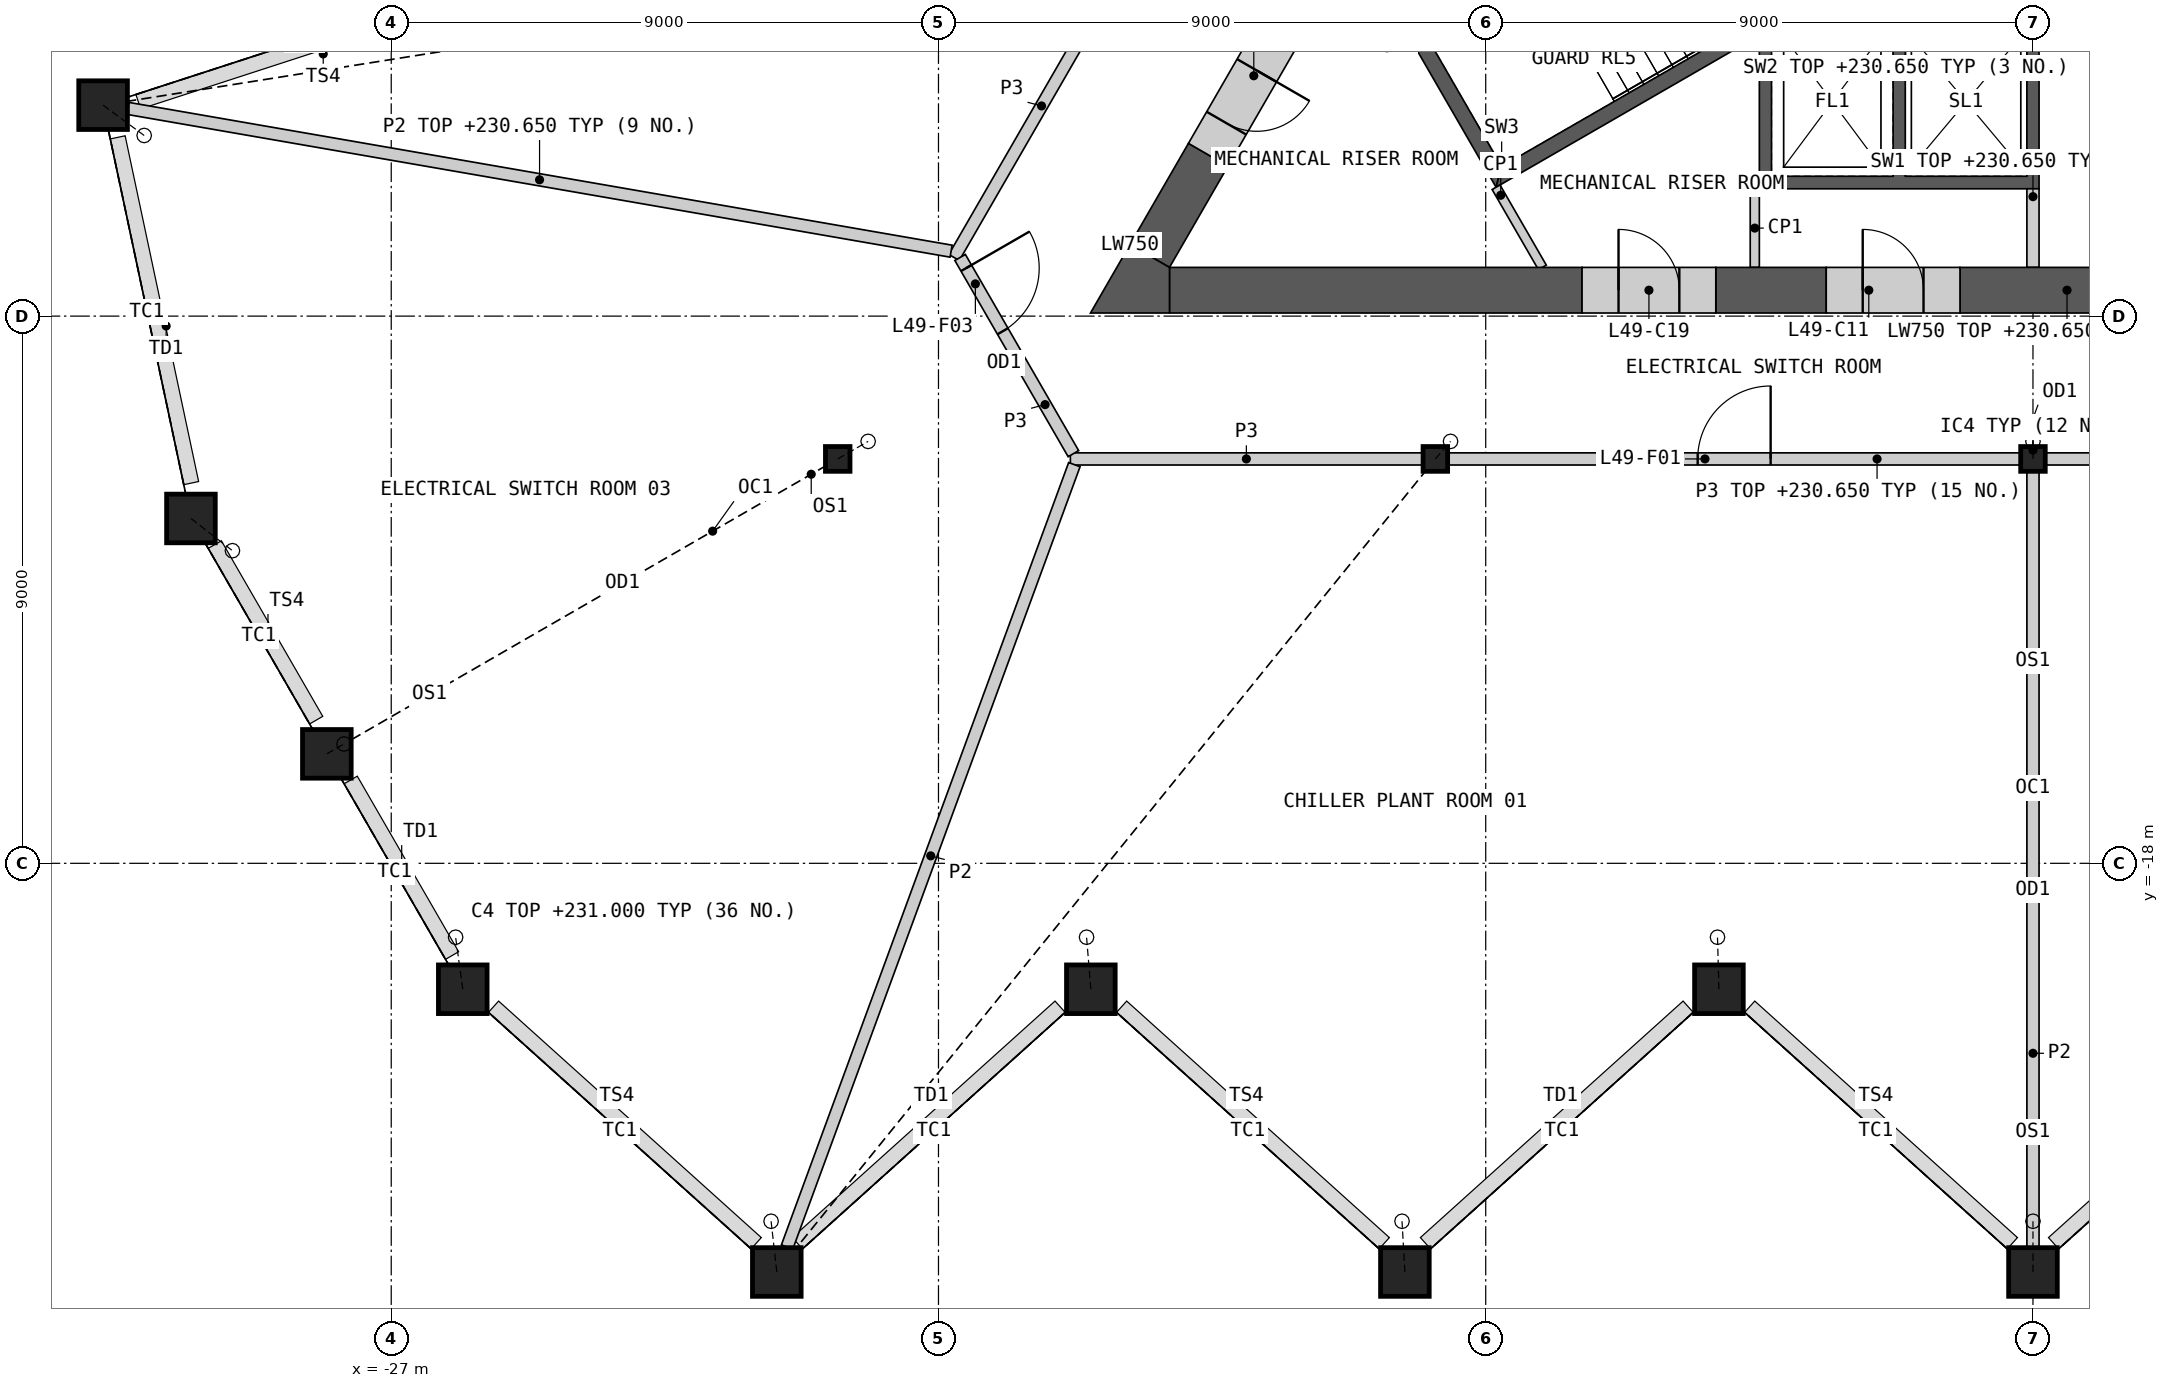
"""IFC4 building model, lengths in metres.
Left out: names, types, materials, properties, quantities, classifications, styles, units other than length and angle.
Written with IfcOpenShell. Run it as: python <this file> out.ifc"""

import sys

from ifc_helpers import new_model, si_unit, direction, frame, frame_2d, origin, origin_2d, place, context, subcontext, project, spatial, polyline, rectangle, hollow_rectangle, i_section, outline, extrude, element, fill, save


model = new_model("IFC4")
c1 = context("Model", 3, precision=1e-05, world=origin(), true_north=direction((0.0, 1.0)))
c2 = subcontext(c1, "Body", "Model", "MODEL_VIEW")
j1 = project(units=[si_unit("LENGTHUNIT", "METRE"), si_unit("PLANEANGLEUNIT", "RADIAN")], contexts=[c1])
p1 = place(None, origin())
s1 = spatial("IfcSite", under=j1, at=p1, CompositionType="ELEMENT")
p2 = place(p1, origin())
s2 = spatial("IfcBuilding", under=s1, at=p2, CompositionType="ELEMENT")
p3 = place(p2, frame((0.0, 0.0, 226.0)))
s3 = spatial("IfcBuildingStorey", under=s2, at=p3, CompositionType="ELEMENT", Elevation=226.0)
p4 = place(p3, frame((-25.823, -20.071, 0.0), z_axis=(-0.023191450174, 0.168691336745, 0.9853960572), x_axis=(-0.990681699534, -0.136197541123, 0.0)))
e1 = element("IfcColumn", 1, at=p4, inside=s3, PredefinedType="COLUMN", context=c2, shape_type="SweptSolid", body=[
    extrude(hollow_rectangle(XDim=0.8, YDim=0.8, WallThickness=0.05, at=origin_2d()), frame((0.0, 0.0, 0.069)), (0.0, 0.0, 1.0), 4.936),
])
p5 = place(p3, frame((-20.659, -24.722, 0.0), z_axis=(-0.01853903048, 0.164636221326, 0.986180114876), x_axis=(-0.993719605933, -0.111898814941, 0.0)))
e2 = element("IfcColumn", 2, at=p5, inside=s3, PredefinedType="COLUMN", context=c2, shape_type="SweptSolid", body=[
    extrude(hollow_rectangle(XDim=0.8, YDim=0.8, WallThickness=0.05, at=origin_2d()), frame((0.0, 0.0, 0.067)), (0.0, 0.0, 1.0), 4.936),
])
p6 = place(p3, frame((-15.494, -20.071, 0.0), z_axis=(-0.013907642807, 0.16872040028, 0.985565829359), x_axis=(-0.996619853329, -0.0821514939, 0.0)))
e3 = element("IfcColumn", 3, at=p6, inside=s3, PredefinedType="COLUMN", context=c2, shape_type="SweptSolid", body=[
    extrude(hollow_rectangle(XDim=0.8, YDim=0.8, WallThickness=0.05, at=origin_2d()), frame((0.0, 0.0, 0.069)), (0.0, 0.0, 1.0), 4.936),
])
p7 = place(p3, frame((-10.329, -24.722, 0.0), z_axis=(-0.00929478787, 0.164657407907, 0.98630702367), x_axis=(-0.998410538481, -0.056359530251, 0.0)))
e4 = element("IfcColumn", 4, at=p7, inside=s3, PredefinedType="COLUMN", context=c2, shape_type="SweptSolid", body=[
    extrude(hollow_rectangle(XDim=0.8, YDim=0.8, WallThickness=0.05, at=origin_2d()), frame((0.0, 0.0, 0.067)), (0.0, 0.0, 1.0), 4.936),
])
p8 = place(p3, frame((-5.165, -20.071, 0.0), z_axis=(-0.004620237367, 0.168734918824, 0.985650638196), x_axis=(-0.999625333796, -0.027371372517, 0.0)))
e5 = element("IfcColumn", 5, at=p8, inside=s3, PredefinedType="COLUMN", context=c2, shape_type="SweptSolid", body=[
    extrude(hollow_rectangle(XDim=0.8, YDim=0.8, WallThickness=0.05, at=origin_2d()), frame((0.0, 0.0, 0.069)), (0.0, 0.0, 1.0), 4.936),
])
p9 = place(p3, frame((0.0, -24.722, 0.0), z_axis=(0.0, 0.164664520998, 0.986349631482), x_axis=(-1.0, 0.0, 0.0)))
e6 = element("IfcColumn", 6, at=p9, inside=s3, PredefinedType="COLUMN", context=c2, shape_type="SweptSolid", body=[
    extrude(hollow_rectangle(XDim=0.8, YDim=0.8, WallThickness=0.05, at=origin_2d()), frame((0.0, 0.0, 0.067)), (0.0, 0.0, 1.0), 4.936),
])
p10 = place(p3, frame((-31.739, -5.53, 0.0), z_axis=(0.133288732676, -0.098377485859, 0.986182530781), x_axis=(0.593843336629, 0.804580692995, 0.0)))
e7 = element("IfcColumn", 7, at=p10, inside=s3, PredefinedType="COLUMN", context=c2, shape_type="SweptSolid", body=[
    extrude(hollow_rectangle(XDim=0.8, YDim=0.8, WallThickness=0.05, at=origin_2d()), frame((0.0, 0.0, 0.067)), (0.0, 0.0, 1.0), 4.936),
])
p11 = place(p3, frame((-30.294, -12.328, 0.0), z_axis=(0.134482076703, -0.104410055973, 0.985399975268), x_axis=(0.613255605762, 0.789884524473, 0.0)))
e8 = element("IfcColumn", 8, at=p11, inside=s3, PredefinedType="COLUMN", context=c2, shape_type="SweptSolid", body=[
    extrude(hollow_rectangle(XDim=0.8, YDim=0.8, WallThickness=0.05, at=origin_2d()), frame((0.0, 0.0, 0.069)), (0.0, 0.0, 1.0), 4.936),
])
p12 = place(p3, frame((-28.059, -16.2, 0.0), z_axis=(0.056374318387, 0.032548007504, 0.997879032465), x_axis=(-0.500003221507, 0.866023543838, 0.0)))
e9 = element("IfcColumn", 9, at=p12, inside=s3, PredefinedType="COLUMN", context=c2, shape_type="SweptSolid", body=[
    extrude(hollow_rectangle(XDim=0.8, YDim=0.8, WallThickness=0.05, at=origin_2d()), frame((0.0, 0.0, 0.026)), (0.0, 0.0, 1.0), 4.958),
])
p13 = place(p3, frame((-19.657, -11.349, 0.0), z_axis=(0.099340040995, 0.057333949442, 0.993400409954), x_axis=(-0.499868889286, 0.866101087359, 0.0)))
e10 = element("IfcColumn", 10, at=p13, inside=s3, PredefinedType="COLUMN", context=c2, shape_type="SweptSolid", body=[
    extrude(i_section(OverallWidth=0.404, OverallDepth=0.407, WebThickness=0.027, FlangeThickness=0.044, at=origin_2d()), frame((0.0, 0.0, 0.023)), (0.0, 0.0, 1.0), 4.986),
])
p14 = place(p3, frame((-9.828, -11.349, 0.0), z_axis=(0.049854859349, 0.057547308351, 0.997097186989), x_axis=(-0.755815657913, 0.654784461677, 0.0)))
e11 = element("IfcColumn", 11, at=p14, inside=s3, PredefinedType="COLUMN", context=c2, shape_type="SweptSolid", body=[
    extrude(i_section(OverallWidth=0.404, OverallDepth=0.407, WebThickness=0.027, FlangeThickness=0.044, at=origin_2d()), frame((0.0, 0.0, 0.016)), (0.0, 0.0, 1.0), 4.983),
])
p15 = place(p3, frame((0.0, -11.349, 0.0), z_axis=(0.0, 0.057618959063, 0.998338647733), x_axis=(-1.0, 0.0, 0.0)))
e12 = element("IfcColumn", 12, at=p15, inside=s3, PredefinedType="COLUMN", context=c2, shape_type="SweptSolid", body=[
    extrude(i_section(OverallWidth=0.404, OverallDepth=0.407, WebThickness=0.027, FlangeThickness=0.044, at=origin_2d()), frame((0.0, 0.0, 0.012)), (0.0, 0.0, 1.0), 4.985),
])
p16 = place(p3, origin())
e13 = element("IfcWall", 13, at=p16, inside=s3, PredefinedType="SHEAR", context=c2, shape_type="SweptSolid", body=[
    extrude(outline(polyline([(0.1, -4.4), (0.1, -6.906), (-4.5, -6.906), (-4.5, -4.4), (-4.3, -4.4), (-4.3, -6.7), (-2.3, -6.7), (-2.3, -4.4), (-2.1, -4.4), (-2.1, -6.7), (-0.1, -6.7), (-0.1, -4.4), (0.1, -4.4)])), origin(), (0.0, 0.0, 1.0), 4.65),
])
p17 = place(p3, frame((0.0, -6.906, 0.0), z_axis=(0.0, 0.0, 1.0), x_axis=(0.0, -1.0, 0.0)))
e14 = element("IfcWall", 14, at=p17, inside=s3, PredefinedType="SHEAR", context=c2, shape_type="SweptSolid", body=[
    extrude(rectangle(XDim=1.293, YDim=0.2, at=frame_2d((0.646, 0.0))), origin(), (0.0, 0.0, 1.0), 4.65),
])
p18 = place(p3, origin())
e15 = element("IfcWall", 15, at=p18, inside=s3, PredefinedType="SHEAR", context=c2, shape_type="SweptSolid", body=[
    extrude(outline(polyline([(-10.374, -4.206), (-8.83, -6.881), (-8.738, -6.539), (-10.032, -4.298), (-10.374, -4.206)])), origin(), (0.0, 0.0, 1.0), 4.65),
])
p19 = place(p3, origin())
e16 = element("IfcWall", 16, at=p19, inside=s3, PredefinedType="SHEAR", context=c2, shape_type="SweptSolid", body=[
    extrude(outline(polyline([(-8.738, -6.539), (-8.83, -6.881), (-3.763, -3.956), (-3.888, -3.739), (-8.738, -6.539)])), origin(), (0.0, 0.0, 1.0), 4.65),
])
p20 = place(p3, frame((-4.575, -6.906, 0.0), z_axis=(0.0, 0.0, 1.0), x_axis=(0.0, -1.0, 0.0)))
e17 = element("IfcWall", 17, at=p20, inside=s3, PredefinedType="PARTITIONING", context=c2, shape_type="SweptSolid", body=[
    extrude(rectangle(XDim=1.293, YDim=0.15, at=frame_2d((0.646, 0.0))), origin(), (0.0, 0.0, 1.0), 4.65),
])
p21 = place(p3, frame((-8.83, -6.881, 0.0), z_axis=(0.0, 0.0, 1.0), x_axis=(0.500037110984, -0.866003976688, 0.0)))
e18 = element("IfcWall", 18, at=p21, inside=s3, PredefinedType="PARTITIONING", context=c2, shape_type="SweptSolid", body=[
    extrude(rectangle(XDim=1.522, YDim=0.15, at=frame_2d((0.761, 0.0))), origin(), (0.0, 0.0, 1.0), 4.65),
])
p22 = place(p3, frame((-14.201, -8.574, 0.0), z_axis=(0.0, 0.0, 1.0), x_axis=(1.0, 0.0, 0.0)))
e19 = element("IfcWall", 19, at=p22, inside=s3, PredefinedType="SHEAR", context=c2, shape_type="SweptSolid", body=[
    extrude(rectangle(XDim=6.785, YDim=0.75, at=frame_2d((3.393, 0.0))), origin(), (0.0, 0.0, 1.0), 4.65),
])
p23 = place(p3, frame((-1.2, -8.574, 0.0), z_axis=(0.0, 0.0, 1.0), x_axis=(1.0, 0.0, 0.0)))
e20 = element("IfcWall", 20, at=p23, inside=s3, PredefinedType="SHEAR", context=c2, shape_type="SweptSolid", body=[
    extrude(rectangle(XDim=3.52, YDim=0.75, at=frame_2d((1.76, 0.0))), origin(), (0.0, 0.0, 1.0), 4.65),
])
p24 = place(p3, frame((-5.216, -8.574, 0.0), z_axis=(0.0, 0.0, 1.0), x_axis=(1.0, 0.0, 0.0)))
e21 = element("IfcWall", 21, at=p24, inside=s3, PredefinedType="SHEAR", context=c2, shape_type="SweptSolid", body=[
    extrude(rectangle(XDim=1.816, YDim=0.75, at=frame_2d((0.908, 0.0))), origin(), (0.0, 0.0, 1.0), 4.65),
])
p25 = place(p3, frame((-13.564, -6.346, 0.0), z_axis=(0.0, 0.0, 1.0), x_axis=(-0.499989888488, -0.86603124159, 0.0)))
e22 = element("IfcWall", 22, at=p25, inside=s3, PredefinedType="SHEAR", context=c2, shape_type="SweptSolid", body=[
    extrude(rectangle(XDim=1.923, YDim=0.75, at=frame_2d((0.961, 0.0))), origin(), (0.0, 0.0, 1.0), 4.65),
])
p26 = place(p3, origin())
e23 = element("IfcWall", 23, at=p26, inside=s3, PredefinedType="SHEAR", context=c2, shape_type="SweptSolid", body=[
    extrude(outline(polyline([(-14.851, -7.824), (-14.201, -8.199), (-14.201, -8.949), (-15.5, -8.949), (-14.851, -7.824)])), origin(), (0.0, 0.0, 1.0), 4.65),
])
p27 = place(p3, frame((-3.4, -8.574, 0.0), z_axis=(0.0, 0.0, 1.0), x_axis=(1.0, 0.0, 0.0)))
e24 = element("IfcWall", 24, at=p27, inside=s3, PredefinedType="SHEAR", context=c2, shape_type="SweptSolid", body=[
    extrude(rectangle(XDim=2.2, YDim=0.75, at=frame_2d((1.1, 0.0))), origin(), (0.0, 0.0, 1.0), 4.65),
])
p28 = place(p27, frame((0.6, 0.0, 0.0)))
e25 = element("IfcOpeningElement", 25, at=p28, cuts=e24, PredefinedType="OPENING", context=c2, shape_type="SweptSolid", body=[
    extrude(rectangle(XDim=1.0, YDim=2.1, at=frame_2d((0.5, 1.05))), frame((0.0, 0.385, 0.0), z_axis=(0.0, -1.0, 0.0), x_axis=(1.0, 0.0, 0.0)), (0.0, 0.0, 1.0), 0.77),
])
p29 = place(p3, frame((-12.464, -4.441, 0.0), z_axis=(0.0, 0.0, 1.0), x_axis=(-0.499994660107, -0.866028486751, 0.0)))
e26 = element("IfcWall", 26, at=p29, inside=s3, PredefinedType="SHEAR", context=c2, shape_type="SweptSolid", body=[
    extrude(rectangle(XDim=2.2, YDim=0.75, at=frame_2d((1.1, 0.0))), origin(), (0.0, 0.0, 1.0), 4.65),
])
p30 = place(p29, frame((0.6, 0.0, 0.0)))
e27 = element("IfcOpeningElement", 27, at=p30, cuts=e26, PredefinedType="OPENING", context=c2, shape_type="SweptSolid", body=[
    extrude(rectangle(XDim=1.0, YDim=2.1, at=frame_2d((0.5, 1.05))), frame((0.0, 0.385, 0.0), z_axis=(0.0, -1.0, 0.0), x_axis=(1.0, 0.0, 0.0)), (0.0, 0.0, 1.0), 0.77),
])
p31 = place(p3, frame((-7.416, -8.574, 0.0), z_axis=(0.0, 0.0, 1.0), x_axis=(1.0, 0.0, 0.0)))
e28 = element("IfcWall", 28, at=p31, inside=s3, PredefinedType="SHEAR", context=c2, shape_type="SweptSolid", body=[
    extrude(rectangle(XDim=2.2, YDim=0.75, at=frame_2d((1.1, 0.0))), origin(), (0.0, 0.0, 1.0), 4.65),
])
p32 = place(p31, frame((0.6, 0.0, 0.0)))
e29 = element("IfcOpeningElement", 29, at=p32, cuts=e28, PredefinedType="OPENING", context=c2, shape_type="SweptSolid", body=[
    extrude(rectangle(XDim=1.0, YDim=2.1, at=frame_2d((0.5, 1.05))), frame((0.0, 0.385, 0.0), z_axis=(0.0, -1.0, 0.0), x_axis=(1.0, 0.0, 0.0)), (0.0, 0.0, 1.0), 0.77),
])
p33 = place(p3, frame((-9.615, -11.349, 0.0), z_axis=(0.0, 0.0, 1.0), x_axis=(1.0, 0.0, 0.0)))
e30 = element("IfcWall", 30, at=p33, inside=s3, PredefinedType="PARTITIONING", context=c2, shape_type="SweptSolid", body=[
    extrude(rectangle(XDim=9.401, YDim=0.2, at=frame_2d((4.701, 0.0))), origin(), (0.0, 0.0, 1.0), 4.65),
])
p34 = place(p33, frame((4.101, 0.0, 0.0)))
e31 = element("IfcOpeningElement", 31, at=p34, cuts=e30, PredefinedType="OPENING", context=c2, shape_type="SweptSolid", body=[
    extrude(rectangle(XDim=1.2, YDim=2.1, at=frame_2d((0.6, 1.05))), frame((0.0, 0.11, 0.0), z_axis=(0.0, -1.0, 0.0), x_axis=(1.0, 0.0, 0.0)), (0.0, 0.0, 1.0), 0.22),
])
p35 = place(p3, frame((0.214, -11.349, 0.0), z_axis=(0.0, 0.0, 1.0), x_axis=(1.0, 0.0, 0.0)))
e32 = element("IfcWall", 32, at=p35, inside=s3, PredefinedType="PARTITIONING", context=c2, shape_type="SweptSolid", body=[
    extrude(rectangle(XDim=9.401, YDim=0.2, at=frame_2d((4.701, 0.0))), origin(), (0.0, 0.0, 1.0), 4.65),
])
p36 = place(p35, frame((4.101, 0.0, 0.0)))
e33 = element("IfcOpeningElement", 33, at=p36, cuts=e32, PredefinedType="OPENING", context=c2, shape_type="SweptSolid", body=[
    extrude(rectangle(XDim=1.2, YDim=2.1, at=frame_2d((0.6, 1.05))), frame((0.0, 0.11, 0.0), z_axis=(0.0, -1.0, 0.0), x_axis=(1.0, 0.0, 0.0)), (0.0, 0.0, 1.0), 0.22),
])
p37 = place(p3, frame((-15.831, -11.349, 0.0), z_axis=(0.0, 0.0, 1.0), x_axis=(1.0, 0.0, 0.0)))
e34 = element("IfcWall", 34, at=p37, inside=s3, PredefinedType="PARTITIONING", context=c2, shape_type="SweptSolid", body=[
    extrude(rectangle(XDim=5.789, YDim=0.2, at=frame_2d((2.894, 0.0))), origin(), (0.0, 0.0, 1.0), 4.65),
])
p38 = place(p3, frame((-17.744, -8.035, 0.0), z_axis=(0.0, 0.0, 1.0), x_axis=(0.499975807604, 0.86603937082, 0.0)))
e35 = element("IfcWall", 35, at=p38, inside=s3, PredefinedType="PARTITIONING", context=c2, shape_type="SweptSolid", body=[
    extrude(rectangle(XDim=5.756, YDim=0.2, at=frame_2d((2.878, 0.0))), origin(), (0.0, 0.0, 1.0), 4.65),
])
p39 = place(p3, frame((-17.644, -8.035, 0.0), z_axis=(0.0, 0.0, 1.0), x_axis=(0.499958791762, -0.866049194065, 0.0)))
e36 = element("IfcWall", 36, at=p39, inside=s3, PredefinedType="PARTITIONING", context=c2, shape_type="SweptSolid", body=[
    extrude(rectangle(XDim=3.726, YDim=0.2, at=frame_2d((1.863, 0.0))), origin(), (0.0, 0.0, 1.0), 4.65),
])
p40 = place(p39, frame((0.201, 0.0, 0.0)))
e37 = element("IfcOpeningElement", 37, at=p40, cuts=e36, PredefinedType="OPENING", context=c2, shape_type="SweptSolid", body=[
    extrude(rectangle(XDim=1.2, YDim=2.1, at=frame_2d((0.6, 1.05))), frame((0.0, 0.11, 0.0), z_axis=(0.0, -1.0, 0.0), x_axis=(1.0, 0.0, 0.0)), (0.0, 0.0, 1.0), 0.22),
])
p41 = place(p3, frame((-31.329, -5.584, 0.0), z_axis=(0.0, 0.0, 1.0), x_axis=(0.985288995773, -0.170896444691, 0.0)))
e38 = element("IfcWall", 38, at=p41, inside=s3, PredefinedType="PARTITIONING", context=c2, shape_type="SweptSolid", body=[
    extrude(rectangle(XDim=13.739, YDim=0.2, at=frame_2d((6.869, 0.0))), origin(), (0.0, 0.0, 1.0), 4.65),
])
p42 = place(p3, frame((-20.49, -24.312, 0.0), z_axis=(0.0, 0.0, 1.0), x_axis=(0.344647088239, 0.938732328498, 0.0)))
e39 = element("IfcWall", 39, at=p42, inside=s3, PredefinedType="PARTITIONING", context=c2, shape_type="SweptSolid", body=[
    extrude(rectangle(XDim=13.708, YDim=0.2, at=frame_2d((6.854, 0.0))), origin(), (0.0, 0.0, 1.0), 4.65),
])
p43 = place(p3, frame((0.0, -24.312, 0.0), z_axis=(0.0, 0.0, 1.0), x_axis=(0.0, 1.0, 0.0)))
e40 = element("IfcWall", 40, at=p43, inside=s3, PredefinedType="PARTITIONING", context=c2, shape_type="SweptSolid", body=[
    extrude(rectangle(XDim=12.749, YDim=0.2, at=frame_2d((6.375, 0.0))), origin(), (0.0, 0.0, 1.0), 4.65),
])
p44 = place(p28, origin())
e41 = element("IfcDoor", 41, at=p44, inside=s3, OperationType="SINGLE_SWING_LEFT", PredefinedType="DOOR", context=c2, shape_type="SweptSolid", body=[
    extrude(rectangle(XDim=1.0, YDim=2.1, at=frame_2d((0.5, 1.05))), frame((0.0, 0.13, 0.0), z_axis=(0.0, -1.0, 0.0), x_axis=(1.0, 0.0, 0.0)), (0.0, 0.0, 1.0), 0.05),
])
fill(e25, e41)
p45 = place(p30, origin())
e42 = element("IfcDoor", 42, at=p45, inside=s3, OperationType="SINGLE_SWING_LEFT", PredefinedType="DOOR", context=c2, shape_type="SweptSolid", body=[
    extrude(rectangle(XDim=1.0, YDim=2.1, at=frame_2d((0.5, 1.05))), frame((0.0, 0.13, 0.0), z_axis=(0.0, -1.0, 0.0), x_axis=(1.0, 0.0, 0.0)), (0.0, 0.0, 1.0), 0.05),
])
fill(e27, e42)
p46 = place(p32, origin())
e43 = element("IfcDoor", 43, at=p46, inside=s3, OperationType="SINGLE_SWING_LEFT", PredefinedType="DOOR", context=c2, shape_type="SweptSolid", body=[
    extrude(rectangle(XDim=1.0, YDim=2.1, at=frame_2d((0.5, 1.05))), frame((0.0, 0.13, 0.0), z_axis=(0.0, -1.0, 0.0), x_axis=(1.0, 0.0, 0.0)), (0.0, 0.0, 1.0), 0.05),
])
fill(e29, e43)
p47 = place(p34, origin())
e44 = element("IfcDoor", 44, at=p47, inside=s3, OperationType="SINGLE_SWING_RIGHT", PredefinedType="DOOR", context=c2, shape_type="SweptSolid", body=[
    extrude(rectangle(XDim=1.2, YDim=2.1, at=frame_2d((0.6, 1.05))), frame((0.0, 0.025, 0.0), z_axis=(0.0, -1.0, 0.0), x_axis=(1.0, 0.0, 0.0)), (0.0, 0.0, 1.0), 0.05),
])
fill(e31, e44)
p48 = place(p40, origin())
e45 = element("IfcDoor", 45, at=p48, inside=s3, OperationType="SINGLE_SWING_LEFT", PredefinedType="DOOR", context=c2, shape_type="SweptSolid", body=[
    extrude(rectangle(XDim=1.2, YDim=2.1, at=frame_2d((0.6, 1.05))), frame((0.0, 0.025, 0.0), z_axis=(0.0, -1.0, 0.0), x_axis=(1.0, 0.0, 0.0)), (0.0, 0.0, 1.0), 0.05),
])
fill(e37, e45)
save(model, sys.argv[1])
